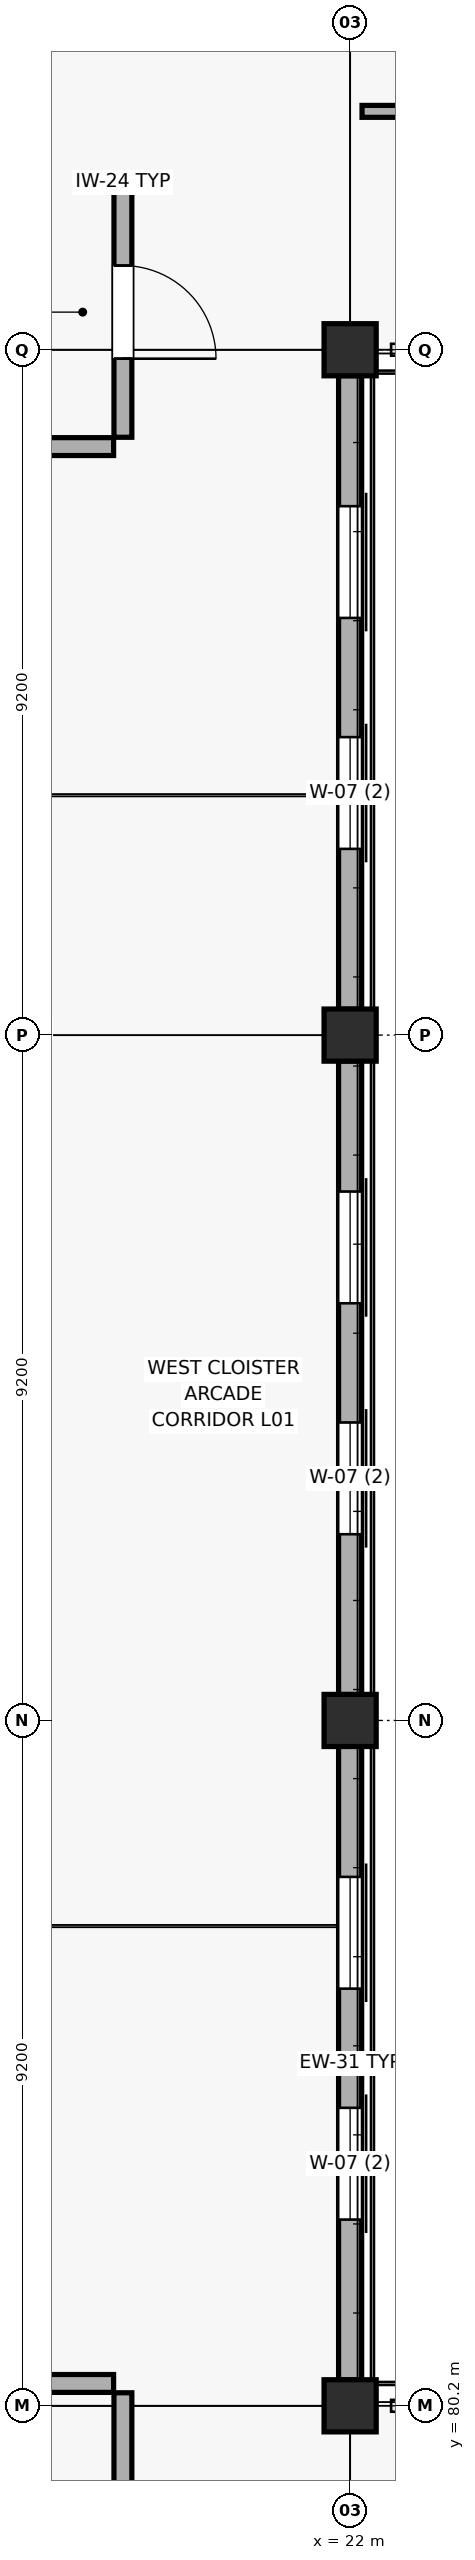
"""IFC4 building model, lengths in metres.
Left out: names, types, materials, properties, quantities, classifications, styles, units other than length and angle.
Written with IfcOpenShell. Run it as: python <this file> out.ifc"""

import sys

from ifc_helpers import new_model, si_unit, direction, frame, frame_2d, origin, origin_2d, place, context, subcontext, project, spatial, rectangle, extrude, element, fill, save


model = new_model("IFC4")
c1 = context("Model", 3, precision=1e-05, world=origin(), true_north=direction((0.0, 1.0)))
c2 = subcontext(c1, "Body", "Model", "MODEL_VIEW")
j1 = project(units=[si_unit("LENGTHUNIT", "METRE"), si_unit("PLANEANGLEUNIT", "RADIAN")], contexts=[c1])
p1 = place(None, origin())
s1 = spatial("IfcSite", under=j1, at=p1, CompositionType="ELEMENT")
p2 = place(p1, origin())
s2 = spatial("IfcBuilding", under=s1, at=p2, CompositionType="ELEMENT")
p3 = place(p2, frame((0.0, 0.0, 5.4)))
s3 = spatial("IfcBuildingStorey", under=s2, at=p3, CompositionType="ELEMENT", Elevation=5.4)
for number, where, z_axis, x_axis in (
    (1, (22.0, 80.2, 0.0), (0.0, 0.0, 1.0), (1.0, 0.0, 0.0)),
    (2, (22.0, 89.4, 0.0), (0.0, 0.0, 1.0), (1.0, 0.0, 0.0)),
    (3, (22.0, 98.6, 0.0), (0.0, 0.0, 1.0), (1.0, 0.0, 0.0)),
    (4, (22.0, 107.8, 0.0), (0.0, 0.0, 1.0), (1.0, 0.0, 0.0)),
):
    element("IfcColumn", number, at=place(p3, frame(where, z_axis=z_axis, x_axis=x_axis)), inside=s3, PredefinedType="COLUMN", context=c2, shape_type="SweptSolid", body=[
        extrude(rectangle(XDim=0.7, YDim=0.7, at=origin_2d()), origin(), (0.0, 0.0, 1.0), 4.5),
    ])
p4 = place(p3, frame((22.0, 80.548, 0.0), z_axis=(0.0, 0.0, 1.0), x_axis=(0.0, 1.0, 0.0)))
e5 = element("IfcWall", 5, at=p4, inside=s3, PredefinedType="SOLIDWALL", context=c2, shape_type="SweptSolid", body=[
    extrude(rectangle(XDim=8.504, YDim=0.31, at=frame_2d((4.252, 0.0))), origin(), (0.0, 0.0, 1.0), 3.725),
])
p5 = place(p4, frame((2.152, 0.0, 0.95)))
e6 = element("IfcOpeningElement", 6, at=p5, cuts=e5, PredefinedType="OPENING", context=c2, shape_type="SweptSolid", body=[
    extrude(rectangle(XDim=1.5, YDim=2.25, at=frame_2d((0.75, 1.125))), frame((0.0, 0.165, 0.0), z_axis=(0.0, -1.0, 0.0), x_axis=(1.0, 0.0, 0.0)), (0.0, 0.0, 1.0), 0.33),
])
p6 = place(p4, frame((5.252, 0.0, 0.95)))
e7 = element("IfcOpeningElement", 7, at=p6, cuts=e5, PredefinedType="OPENING", context=c2, shape_type="SweptSolid", body=[
    extrude(rectangle(XDim=1.5, YDim=2.25, at=frame_2d((0.75, 1.125))), frame((0.0, 0.165, 0.0), z_axis=(0.0, -1.0, 0.0), x_axis=(1.0, 0.0, 0.0)), (0.0, 0.0, 1.0), 0.33),
])
p7 = place(p3, frame((22.0, 89.748, 0.0), z_axis=(0.0, 0.0, 1.0), x_axis=(0.0, 1.0, 0.0)))
e8 = element("IfcWall", 8, at=p7, inside=s3, PredefinedType="SOLIDWALL", context=c2, shape_type="SweptSolid", body=[
    extrude(rectangle(XDim=8.504, YDim=0.31, at=frame_2d((4.252, 0.0))), origin(), (0.0, 0.0, 1.0), 3.725),
])
p8 = place(p7, frame((2.152, 0.0, 0.95)))
e9 = element("IfcOpeningElement", 9, at=p8, cuts=e8, PredefinedType="OPENING", context=c2, shape_type="SweptSolid", body=[
    extrude(rectangle(XDim=1.5, YDim=2.25, at=frame_2d((0.75, 1.125))), frame((0.0, 0.165, 0.0), z_axis=(0.0, -1.0, 0.0), x_axis=(1.0, 0.0, 0.0)), (0.0, 0.0, 1.0), 0.33),
])
p9 = place(p7, frame((5.252, 0.0, 0.95)))
e10 = element("IfcOpeningElement", 10, at=p9, cuts=e8, PredefinedType="OPENING", context=c2, shape_type="SweptSolid", body=[
    extrude(rectangle(XDim=1.5, YDim=2.25, at=frame_2d((0.75, 1.125))), frame((0.0, 0.165, 0.0), z_axis=(0.0, -1.0, 0.0), x_axis=(1.0, 0.0, 0.0)), (0.0, 0.0, 1.0), 0.33),
])
p10 = place(p3, frame((22.0, 98.948, 0.0), z_axis=(0.0, 0.0, 1.0), x_axis=(0.0, 1.0, 0.0)))
e11 = element("IfcWall", 11, at=p10, inside=s3, PredefinedType="SOLIDWALL", context=c2, shape_type="SweptSolid", body=[
    extrude(rectangle(XDim=8.504, YDim=0.31, at=frame_2d((4.252, 0.0))), origin(), (0.0, 0.0, 1.0), 3.725),
])
p11 = place(p10, frame((2.152, 0.0, 0.95)))
e12 = element("IfcOpeningElement", 12, at=p11, cuts=e11, PredefinedType="OPENING", context=c2, shape_type="SweptSolid", body=[
    extrude(rectangle(XDim=1.5, YDim=2.25, at=frame_2d((0.75, 1.125))), frame((0.0, 0.165, 0.0), z_axis=(0.0, -1.0, 0.0), x_axis=(1.0, 0.0, 0.0)), (0.0, 0.0, 1.0), 0.33),
])
p12 = place(p10, frame((5.252, 0.0, 0.95)))
e13 = element("IfcOpeningElement", 13, at=p12, cuts=e11, PredefinedType="OPENING", context=c2, shape_type="SweptSolid", body=[
    extrude(rectangle(XDim=1.5, YDim=2.25, at=frame_2d((0.75, 1.125))), frame((0.0, 0.165, 0.0), z_axis=(0.0, -1.0, 0.0), x_axis=(1.0, 0.0, 0.0)), (0.0, 0.0, 1.0), 0.33),
])
p13 = place(p3, frame((0.175, 106.5, 0.0), z_axis=(0.0, 0.0, 1.0), x_axis=(1.0, 0.0, 0.0)))
e14 = element("IfcWall", 14, at=p13, inside=s3, PredefinedType="PARTITIONING", context=c2, shape_type="SweptSolid", body=[
    extrude(rectangle(XDim=18.65, YDim=0.24, at=frame_2d((9.325, 0.0))), origin(), (0.0, 0.0, 1.0), 3.725),
])
p14 = place(p13, frame((15.825, 0.0, 0.0)))
e15 = element("IfcOpeningElement", 15, at=p14, cuts=e14, PredefinedType="OPENING", context=c2, shape_type="SweptSolid", body=[
    extrude(rectangle(XDim=1.25, YDim=2.2, at=frame_2d((0.625, 1.1))), frame((0.0, 0.13, 0.0), z_axis=(0.0, -1.0, 0.0), x_axis=(1.0, 0.0, 0.0)), (0.0, 0.0, 1.0), 0.26),
])
p15 = place(p3, frame((0.175, 80.5, 0.0), z_axis=(0.0, 0.0, 1.0), x_axis=(1.0, 0.0, 0.0)))
e16 = element("IfcWall", 16, at=p15, inside=s3, PredefinedType="PARTITIONING", context=c2, shape_type="SweptSolid", body=[
    extrude(rectangle(XDim=18.65, YDim=0.24, at=frame_2d((9.325, 0.0))), origin(), (0.0, 0.0, 1.0), 3.625),
])
p16 = place(p15, frame((15.825, 0.0, 0.0)))
e17 = element("IfcOpeningElement", 17, at=p16, cuts=e16, PredefinedType="OPENING", context=c2, shape_type="SweptSolid", body=[
    extrude(rectangle(XDim=1.25, YDim=2.2, at=frame_2d((0.625, 1.1))), frame((0.0, 0.13, 0.0), z_axis=(0.0, -1.0, 0.0), x_axis=(1.0, 0.0, 0.0)), (0.0, 0.0, 1.0), 0.26),
])
p17 = place(p3, frame((18.95, 106.625, 0.0), z_axis=(0.0, 0.0, 1.0), x_axis=(0.0, 1.0, 0.0)))
e18 = element("IfcWall", 18, at=p17, inside=s3, PredefinedType="PARTITIONING", context=c2, shape_type="SweptSolid", body=[
    extrude(rectangle(XDim=3.525, YDim=0.24, at=frame_2d((1.762, 0.0))), origin(), (0.0, 0.0, 1.0), 3.625),
])
p18 = place(p17, frame((1.055, 0.0, 0.0)))
e19 = element("IfcOpeningElement", 19, at=p18, cuts=e18, PredefinedType="OPENING", context=c2, shape_type="SweptSolid", body=[
    extrude(rectangle(XDim=1.25, YDim=2.2, at=frame_2d((0.625, 1.1))), frame((0.0, 0.13, 0.0), z_axis=(0.0, -1.0, 0.0), x_axis=(1.0, 0.0, 0.0)), (0.0, 0.0, 1.0), 0.26),
])
p19 = place(p3, frame((18.95, 76.85, 0.0), z_axis=(0.0, 0.0, 1.0), x_axis=(0.0, 1.0, 0.0)))
e20 = element("IfcWall", 20, at=p19, inside=s3, PredefinedType="PARTITIONING", context=c2, shape_type="SweptSolid", body=[
    extrude(rectangle(XDim=3.525, YDim=0.24, at=frame_2d((1.762, 0.0))), origin(), (0.0, 0.0, 1.0), 3.625),
])
p20 = place(p19, frame((1.05, 0.0, 0.0)))
e21 = element("IfcOpeningElement", 21, at=p20, cuts=e20, PredefinedType="OPENING", context=c2, shape_type="SweptSolid", body=[
    extrude(rectangle(XDim=1.25, YDim=2.2, at=frame_2d((0.625, 1.1))), frame((0.0, 0.13, 0.0), z_axis=(0.0, -1.0, 0.0), x_axis=(1.0, 0.0, 0.0)), (0.0, 0.0, 1.0), 0.26),
])
p21 = place(p3, frame((22.16, 111.0, 0.0), z_axis=(0.0, 0.0, 1.0), x_axis=(1.0, 0.0, 0.0)))
e22 = element("IfcWall", 22, at=p21, inside=s3, PredefinedType="PARTITIONING", context=c2, shape_type="SweptSolid", body=[
    extrude(rectangle(XDim=43.68, YDim=0.16, at=frame_2d((21.84, 0.0))), origin(), (0.0, 0.0, 1.0), 3.725),
])
p22 = place(p21, frame((12.0, 0.0, 0.0)))
e23 = element("IfcOpeningElement", 23, at=p22, cuts=e22, PredefinedType="OPENING", context=c2, shape_type="SweptSolid", body=[
    extrude(rectangle(XDim=1.7, YDim=2.35, at=frame_2d((0.85, 1.175))), frame((0.0, 0.09, 0.0), z_axis=(0.0, -1.0, 0.0), x_axis=(1.0, 0.0, 0.0)), (0.0, 0.0, 1.0), 0.18),
])
p23 = place(p21, frame((35.5, 0.0, 0.0)))
e24 = element("IfcOpeningElement", 24, at=p23, cuts=e22, PredefinedType="OPENING", context=c2, shape_type="SweptSolid", body=[
    extrude(rectangle(XDim=1.02, YDim=2.15, at=frame_2d((0.51, 1.075))), frame((0.0, 0.09, 0.0), z_axis=(0.0, -1.0, 0.0), x_axis=(1.0, 0.0, 0.0)), (0.0, 0.0, 1.0), 0.18),
])
p24 = place(p5, origin())
e25 = element("IfcWindow", 25, at=p24, inside=s3, PartitioningType="SINGLE_PANEL", PredefinedType="WINDOW", context=c2, shape_type="SweptSolid", body=[
    extrude(rectangle(XDim=1.5, YDim=2.25, at=frame_2d((0.75, 1.125))), frame((0.0, 0.03, 0.0), z_axis=(0.0, -1.0, 0.0), x_axis=(1.0, 0.0, 0.0)), (0.0, 0.0, 1.0), 0.06),
])
fill(e6, e25)
p25 = place(p6, origin())
e26 = element("IfcWindow", 26, at=p25, inside=s3, PartitioningType="SINGLE_PANEL", PredefinedType="WINDOW", context=c2, shape_type="SweptSolid", body=[
    extrude(rectangle(XDim=1.5, YDim=2.25, at=frame_2d((0.75, 1.125))), frame((0.0, 0.03, 0.0), z_axis=(0.0, -1.0, 0.0), x_axis=(1.0, 0.0, 0.0)), (0.0, 0.0, 1.0), 0.06),
])
fill(e7, e26)
p26 = place(p8, origin())
e27 = element("IfcWindow", 27, at=p26, inside=s3, PartitioningType="SINGLE_PANEL", PredefinedType="WINDOW", context=c2, shape_type="SweptSolid", body=[
    extrude(rectangle(XDim=1.5, YDim=2.25, at=frame_2d((0.75, 1.125))), frame((0.0, 0.03, 0.0), z_axis=(0.0, -1.0, 0.0), x_axis=(1.0, 0.0, 0.0)), (0.0, 0.0, 1.0), 0.06),
])
fill(e9, e27)
p27 = place(p9, origin())
e28 = element("IfcWindow", 28, at=p27, inside=s3, PartitioningType="SINGLE_PANEL", PredefinedType="WINDOW", context=c2, shape_type="SweptSolid", body=[
    extrude(rectangle(XDim=1.5, YDim=2.25, at=frame_2d((0.75, 1.125))), frame((0.0, 0.03, 0.0), z_axis=(0.0, -1.0, 0.0), x_axis=(1.0, 0.0, 0.0)), (0.0, 0.0, 1.0), 0.06),
])
fill(e10, e28)
p28 = place(p11, origin())
e29 = element("IfcWindow", 29, at=p28, inside=s3, PartitioningType="SINGLE_PANEL", PredefinedType="WINDOW", context=c2, shape_type="SweptSolid", body=[
    extrude(rectangle(XDim=1.5, YDim=2.25, at=frame_2d((0.75, 1.125))), frame((0.0, 0.03, 0.0), z_axis=(0.0, -1.0, 0.0), x_axis=(1.0, 0.0, 0.0)), (0.0, 0.0, 1.0), 0.06),
])
fill(e12, e29)
p29 = place(p12, origin())
e30 = element("IfcWindow", 30, at=p29, inside=s3, PartitioningType="SINGLE_PANEL", PredefinedType="WINDOW", context=c2, shape_type="SweptSolid", body=[
    extrude(rectangle(XDim=1.5, YDim=2.25, at=frame_2d((0.75, 1.125))), frame((0.0, 0.03, 0.0), z_axis=(0.0, -1.0, 0.0), x_axis=(1.0, 0.0, 0.0)), (0.0, 0.0, 1.0), 0.06),
])
fill(e13, e30)
p30 = place(p18, frame((1.25, 0.0, 0.0), z_axis=(0.0, 0.0, 1.0), x_axis=(-1.0, 0.0, 0.0)))
e31 = element("IfcDoor", 31, at=p30, inside=s3, OperationType="SINGLE_SWING_RIGHT", PredefinedType="DOOR", context=c2, shape_type="SweptSolid", body=[
    extrude(rectangle(XDim=1.25, YDim=2.2, at=frame_2d((0.625, 1.1))), frame((0.0, 0.025, 0.0), z_axis=(0.0, -1.0, 0.0), x_axis=(1.0, 0.0, 0.0)), (0.0, 0.0, 1.0), 0.05),
])
fill(e19, e31)
save(model, sys.argv[1])
